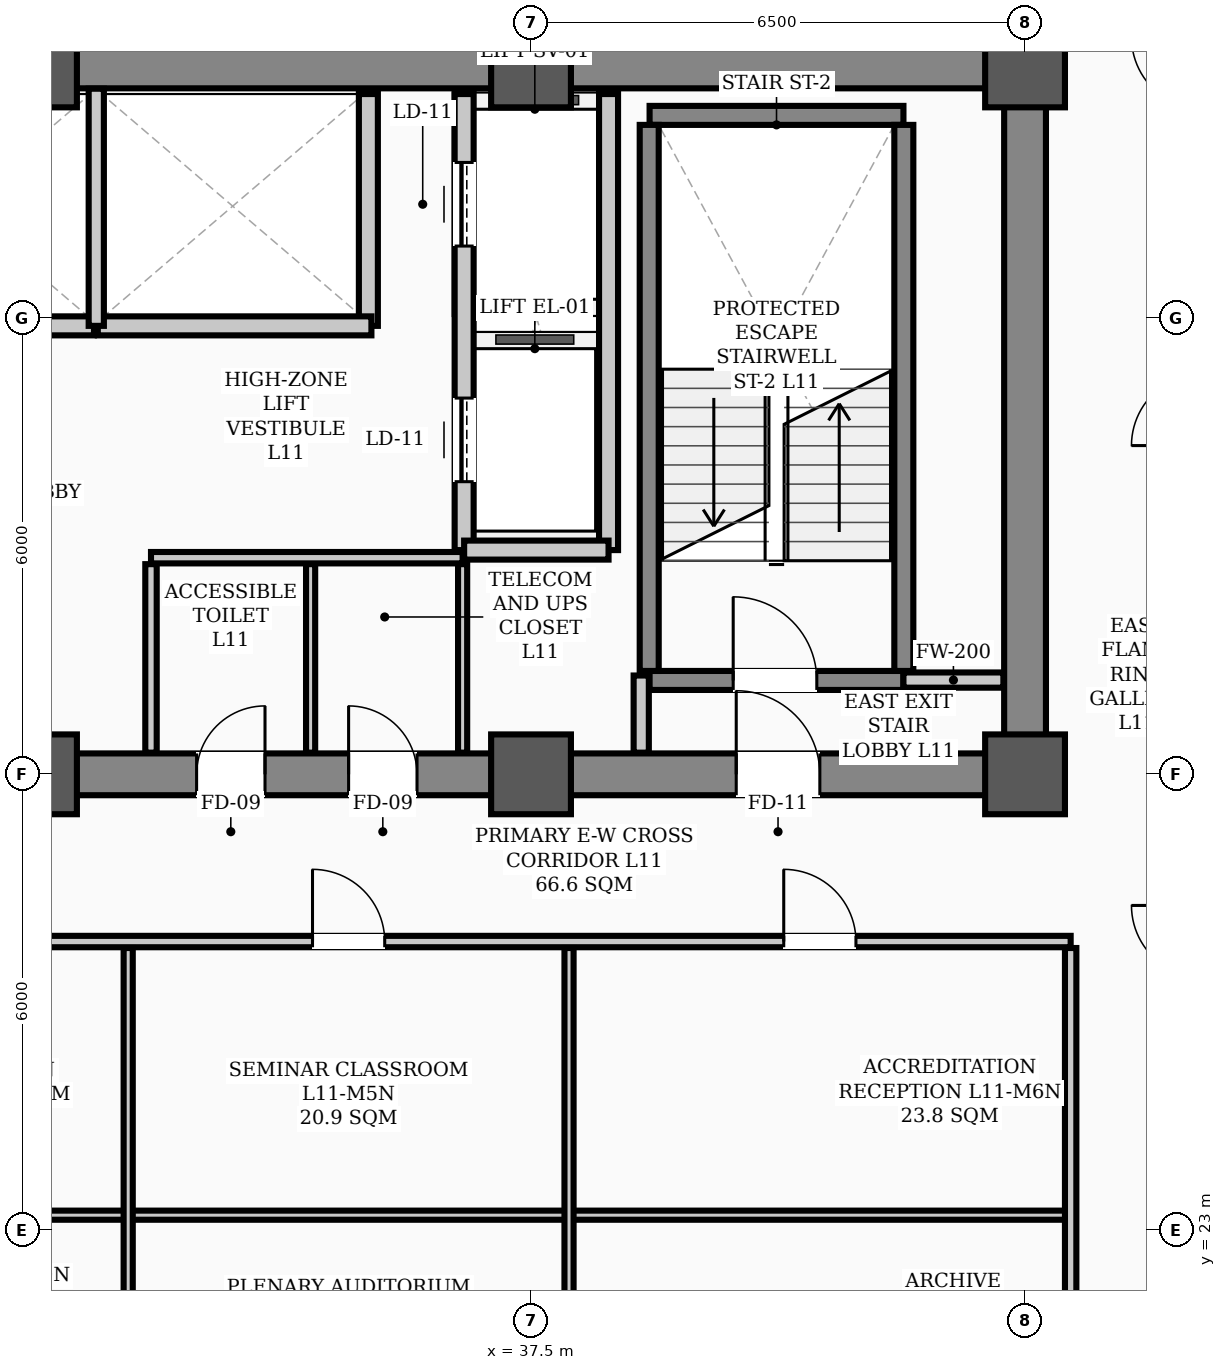
"""IFC4 building model, lengths in metres.
Left out: names, types, materials, properties, quantities, classifications, styles, units other than length and angle.
Written with IfcOpenShell. Run it as: python <this file> out.ifc"""

import sys

from ifc_helpers import new_model, si_unit, direction, frame, frame_2d, origin, origin_2d, place, context, subcontext, project, spatial, rectangle, hollow_rectangle, extrude, element, fill, save


model = new_model("IFC4")
c1 = context("Model", 3, precision=1e-05, world=origin(), true_north=direction((0.0, 1.0)))
c2 = subcontext(c1, "Body", "Model", "MODEL_VIEW")
j1 = project(units=[si_unit("LENGTHUNIT", "METRE"), si_unit("PLANEANGLEUNIT", "RADIAN")], contexts=[c1])
p1 = place(None, origin())
s1 = spatial("IfcSite", under=j1, at=p1, CompositionType="ELEMENT")
p2 = place(p1, origin())
s2 = spatial("IfcBuilding", under=s1, at=p2, CompositionType="ELEMENT")
p3 = place(p2, frame((0.0, 0.0, 46.0)))
s3 = spatial("IfcBuildingStorey", under=s2, at=p3, CompositionType="ELEMENT", Elevation=46.0)
for number, where, z_axis, x_axis in (
    (1, (31.0, 29.0, 0.0), (0.0, 0.0, 1.0), (1.0, 0.0, 0.0)),
    (2, (31.0, 38.3, 0.0), (0.0, 0.0, 1.0), (1.0, 0.0, 0.0)),
    (3, (37.5, 29.0, 0.0), (0.0, 0.0, 1.0), (1.0, 0.0, 0.0)),
    (4, (37.5, 38.3, 0.0), (0.0, 0.0, 1.0), (1.0, 0.0, 0.0)),
    (5, (44.0, 29.0, 0.0), (0.0, 0.0, 1.0), (1.0, 0.0, 0.0)),
    (6, (44.0, 38.3, 0.0), (0.0, 0.0, 1.0), (1.0, 0.0, 0.0)),
):
    element("IfcColumn", number, at=place(p3, frame(where, z_axis=z_axis, x_axis=x_axis)), inside=s3, PredefinedType="COLUMN", context=c2, shape_type="SweptSolid", body=[
        extrude(hollow_rectangle(XDim=1.05, YDim=1.05, WallThickness=0.038, InnerFilletRadius=0.019, OuterFilletRadius=0.057, at=origin_2d()), origin(), (0.0, 0.0, 1.0), 3.9),
    ])
p4 = place(p3, frame((13.5, 29.0, 0.0), z_axis=(0.0, 0.0, 1.0), x_axis=(1.0, 0.0, 0.0)))
e7 = element("IfcWall", 7, at=p4, inside=s3, PredefinedType="SHEAR", context=c2, shape_type="SweptSolid", body=[
    extrude(rectangle(XDim=30.5, YDim=0.55, at=frame_2d((15.25, 0.0))), origin(), (0.0, 0.0, 1.0), 3.72),
])
p5 = place(p4, frame((1.75, 0.0, 0.0)))
e8 = element("IfcOpeningElement", 8, at=p5, cuts=e7, PredefinedType="OPENING", context=c2, shape_type="SweptSolid", body=[
    extrude(rectangle(XDim=1.1, YDim=2.08, at=frame_2d((0.55, 1.04))), frame((0.0, 0.285, 0.0), z_axis=(0.0, -1.0, 0.0), x_axis=(1.0, 0.0, 0.0)), (0.0, 0.0, 1.0), 0.57),
])
p6 = place(p4, frame((26.7, 0.0, 0.0)))
e9 = element("IfcOpeningElement", 9, at=p6, cuts=e7, PredefinedType="OPENING", context=c2, shape_type="SweptSolid", body=[
    extrude(rectangle(XDim=1.1, YDim=2.08, at=frame_2d((0.55, 1.04))), frame((0.0, 0.285, 0.0), z_axis=(0.0, -1.0, 0.0), x_axis=(1.0, 0.0, 0.0)), (0.0, 0.0, 1.0), 0.57),
])
p7 = place(p4, frame((6.8, 0.0, 0.0)))
e10 = element("IfcOpeningElement", 10, at=p7, cuts=e7, PredefinedType="OPENING", context=c2, shape_type="SweptSolid", body=[
    extrude(rectangle(XDim=1.1, YDim=2.08, at=frame_2d((0.55, 1.04))), frame((0.0, 0.285, 0.0), z_axis=(0.0, -1.0, 0.0), x_axis=(1.0, 0.0, 0.0)), (0.0, 0.0, 1.0), 0.57),
])
p8 = place(p4, frame((13.2, 0.0, 0.0)))
e11 = element("IfcOpeningElement", 11, at=p8, cuts=e7, PredefinedType="OPENING", context=c2, shape_type="SweptSolid", body=[
    extrude(rectangle(XDim=1.6, YDim=2.08, at=frame_2d((0.8, 1.04))), frame((0.0, 0.285, 0.0), z_axis=(0.0, -1.0, 0.0), x_axis=(1.0, 0.0, 0.0)), (0.0, 0.0, 1.0), 0.57),
])
p9 = place(p4, frame((19.6, 0.0, 0.0)))
e12 = element("IfcOpeningElement", 12, at=p9, cuts=e7, PredefinedType="OPENING", context=c2, shape_type="SweptSolid", body=[
    extrude(rectangle(XDim=0.9, YDim=2.08, at=frame_2d((0.45, 1.04))), frame((0.0, 0.285, 0.0), z_axis=(0.0, -1.0, 0.0), x_axis=(1.0, 0.0, 0.0)), (0.0, 0.0, 1.0), 0.57),
])
p10 = place(p4, frame((21.6, 0.0, 0.0)))
e13 = element("IfcOpeningElement", 13, at=p10, cuts=e7, PredefinedType="OPENING", context=c2, shape_type="SweptSolid", body=[
    extrude(rectangle(XDim=0.9, YDim=2.08, at=frame_2d((0.45, 1.04))), frame((0.0, 0.285, 0.0), z_axis=(0.0, -1.0, 0.0), x_axis=(1.0, 0.0, 0.0)), (0.0, 0.0, 1.0), 0.57),
])
p11 = place(p3, frame((13.5, 38.3, 0.0), z_axis=(0.0, 0.0, 1.0), x_axis=(1.0, 0.0, 0.0)))
e14 = element("IfcWall", 14, at=p11, inside=s3, PredefinedType="SHEAR", context=c2, shape_type="SweptSolid", body=[
    extrude(rectangle(XDim=30.5, YDim=0.55, at=frame_2d((15.25, 0.0))), origin(), (0.0, 0.0, 1.0), 3.72),
])
p12 = place(p3, frame((44.0, 29.35, 0.0), z_axis=(0.0, 0.0, 1.0), x_axis=(0.0, 1.0, 0.0)))
e15 = element("IfcWall", 15, at=p12, inside=s3, PredefinedType="SHEAR", context=c2, shape_type="SweptSolid", body=[
    extrude(rectangle(XDim=8.6, YDim=0.55, at=frame_2d((4.3, 0.0))), origin(), (0.0, 0.0, 1.0), 3.72),
])
p13 = place(p3, frame((39.06, 30.235, 0.0), z_axis=(0.0, 0.0, 1.0), x_axis=(1.0, 0.0, 0.0)))
e16 = element("IfcWall", 16, at=p13, inside=s3, PredefinedType="STANDARD", context=c2, shape_type="SweptSolid", body=[
    extrude(rectangle(XDim=3.34, YDim=0.25, at=frame_2d((1.67, 0.0))), origin(), (0.0, 0.0, 1.0), 3.72),
])
p14 = place(p13, frame((1.1, 0.0, 0.0)))
e17 = element("IfcOpeningElement", 17, at=p14, cuts=e16, PredefinedType="OPENING", context=c2, shape_type="SweptSolid", body=[
    extrude(rectangle(XDim=1.1, YDim=2.08, at=frame_2d((0.55, 1.04))), frame((0.0, 0.135, 0.0), z_axis=(0.0, -1.0, 0.0), x_axis=(1.0, 0.0, 0.0)), (0.0, 0.0, 1.0), 0.27),
])
p15 = place(p3, frame((39.06, 37.669, 0.0), z_axis=(0.0, 0.0, 1.0), x_axis=(1.0, 0.0, 0.0)))
e18 = element("IfcWall", 18, at=p15, inside=s3, PredefinedType="STANDARD", context=c2, shape_type="SweptSolid", body=[
    extrude(rectangle(XDim=3.34, YDim=0.25, at=frame_2d((1.67, 0.0))), origin(), (0.0, 0.0, 1.0), 3.72),
])
for number, where, z_axis, x_axis in (
    (19, (39.055, 30.36, 0.0), (0.0, 0.0, 1.0), (0.0, 1.0, 0.0)),
    (20, (42.405, 30.36, 0.0), (0.0, 0.0, 1.0), (0.0, 1.0, 0.0)),
):
    element("IfcWall", number, at=place(p3, frame(where, z_axis=z_axis, x_axis=x_axis)), inside=s3, PredefinedType="STANDARD", context=c2, shape_type="SweptSolid", body=[
        extrude(rectangle(XDim=7.184, YDim=0.25, at=frame_2d((3.592, 0.0))), origin(), (0.0, 0.0, 1.0), 3.72),
    ])
p16 = place(p3, frame((36.62, 31.95, 0.0), z_axis=(0.0, 0.0, 1.0), x_axis=(0.0, 1.0, 0.0)))
e21 = element("IfcWall", 21, at=p16, inside=s3, PredefinedType="STANDARD", context=c2, shape_type="SweptSolid", body=[
    extrude(rectangle(XDim=6.0, YDim=0.25, at=frame_2d((3.0, 0.0))), origin(), (0.0, 0.0, 1.0), 3.3),
])
p17 = place(p16, frame((0.9, 0.0, 0.0)))
e22 = element("IfcOpeningElement", 22, at=p17, cuts=e21, PredefinedType="OPENING", context=c2, shape_type="SweptSolid", body=[
    extrude(rectangle(XDim=1.1, YDim=2.08, at=frame_2d((0.55, 1.04))), frame((0.0, 0.135, 0.0), z_axis=(0.0, -1.0, 0.0), x_axis=(1.0, 0.0, 0.0)), (0.0, 0.0, 1.0), 0.27),
])
p18 = place(p16, frame((4.0, 0.0, 0.0)))
e23 = element("IfcOpeningElement", 23, at=p18, cuts=e21, PredefinedType="OPENING", context=c2, shape_type="SweptSolid", body=[
    extrude(rectangle(XDim=1.1, YDim=2.08, at=frame_2d((0.55, 1.04))), frame((0.0, 0.135, 0.0), z_axis=(0.0, -1.0, 0.0), x_axis=(1.0, 0.0, 0.0)), (0.0, 0.0, 1.0), 0.27),
])
p19 = place(p3, frame((38.52, 31.95, 0.0), z_axis=(0.0, 0.0, 1.0), x_axis=(0.0, 1.0, 0.0)))
e24 = element("IfcWall", 24, at=p19, inside=s3, PredefinedType="STANDARD", context=c2, shape_type="SweptSolid", body=[
    extrude(rectangle(XDim=6.0, YDim=0.25, at=frame_2d((3.0, 0.0))), origin(), (0.0, 0.0, 1.0), 3.3),
])
p20 = place(p3, frame((36.62, 31.95, 0.0), z_axis=(0.0, 0.0, 1.0), x_axis=(1.0, 0.0, 0.0)))
e25 = element("IfcWall", 25, at=p20, inside=s3, PredefinedType="STANDARD", context=c2, shape_type="SweptSolid", body=[
    extrude(rectangle(XDim=1.9, YDim=0.25, at=frame_2d((0.95, 0.0))), origin(), (0.0, 0.0, 1.0), 3.48),
])
p21 = place(p3, frame((35.36, 34.9, 0.0), z_axis=(0.0, 0.0, 1.0), x_axis=(0.0, 1.0, 0.0)))
e26 = element("IfcWall", 26, at=p21, inside=s3, PredefinedType="STANDARD", context=c2, shape_type="SweptSolid", body=[
    extrude(rectangle(XDim=3.05, YDim=0.25, at=frame_2d((1.525, 0.0))), origin(), (0.0, 0.0, 1.0), 3.3),
])
p22 = place(p3, frame((28.2, 34.9, 0.0), z_axis=(0.0, 0.0, 1.0), x_axis=(1.0, 0.0, 0.0)))
e27 = element("IfcWall", 27, at=p22, inside=s3, PredefinedType="STANDARD", context=c2, shape_type="SweptSolid", body=[
    extrude(rectangle(XDim=3.55, YDim=0.25, at=frame_2d((1.775, 0.0))), origin(), (0.0, 0.0, 1.0), 3.72),
])
p23 = place(p3, frame((31.8, 34.9, 0.0), z_axis=(0.0, 0.0, 1.0), x_axis=(1.0, 0.0, 0.0)))
e28 = element("IfcWall", 28, at=p23, inside=s3, PredefinedType="STANDARD", context=c2, shape_type="SweptSolid", body=[
    extrude(rectangle(XDim=3.6, YDim=0.25, at=frame_2d((1.8, 0.0))), origin(), (0.0, 0.0, 1.0), 3.72),
])
p24 = place(p3, frame((42.4, 30.24, 0.0), z_axis=(0.0, 0.0, 1.0), x_axis=(1.0, 0.0, 0.0)))
e29 = element("IfcWall", 29, at=p24, inside=s3, PredefinedType="STANDARD", context=c2, shape_type="SweptSolid", body=[
    extrude(rectangle(XDim=1.315, YDim=0.2, at=frame_2d((0.658, 0.0))), origin(), (0.0, 0.0, 1.0), 3.1),
])
p25 = place(p3, frame((32.5, 31.85, 0.0), z_axis=(0.0, 0.0, 1.0), x_axis=(1.0, 0.0, 0.0)))
e30 = element("IfcWall", 30, at=p25, inside=s3, PredefinedType="PARTITIONING", context=c2, shape_type="SweptSolid", body=[
    extrude(rectangle(XDim=4.1, YDim=0.15, at=frame_2d((2.05, 0.0))), origin(), (0.0, 0.0, 1.0), 3.72),
])
p26 = place(p3, frame((12.9, 26.8, 0.0), z_axis=(0.0, 0.0, 1.0), x_axis=(1.0, 0.0, 0.0)))
e31 = element("IfcWall", 31, at=p26, inside=s3, PredefinedType="PARTITIONING", context=c2, shape_type="SweptSolid", body=[
    extrude(rectangle(XDim=31.7, YDim=0.15, at=frame_2d((15.85, 0.0))), origin(), (0.0, 0.0, 1.0), 3.1),
])
p27 = place(p26, frame((13.6, 0.0, 0.0)))
e32 = element("IfcOpeningElement", 32, at=p27, cuts=e31, PredefinedType="OPENING", context=c2, shape_type="SweptSolid", body=[
    extrude(rectangle(XDim=1.6, YDim=2.08, at=frame_2d((0.8, 1.04))), frame((0.0, 0.085, 0.0), z_axis=(0.0, -1.0, 0.0), x_axis=(1.0, 0.0, 0.0)), (0.0, 0.0, 1.0), 0.17),
])
p28 = place(p26, frame((2.175, 0.0, 0.0)))
e33 = element("IfcOpeningElement", 33, at=p28, cuts=e31, PredefinedType="OPENING", context=c2, shape_type="SweptSolid", body=[
    extrude(rectangle(XDim=0.95, YDim=2.08, at=frame_2d((0.475, 1.04))), frame((0.0, 0.085, 0.0), z_axis=(0.0, -1.0, 0.0), x_axis=(1.0, 0.0, 0.0)), (0.0, 0.0, 1.0), 0.17),
])
p29 = place(p26, frame((6.925, 0.0, 0.0)))
e34 = element("IfcOpeningElement", 34, at=p29, cuts=e31, PredefinedType="OPENING", context=c2, shape_type="SweptSolid", body=[
    extrude(rectangle(XDim=0.95, YDim=2.08, at=frame_2d((0.475, 1.04))), frame((0.0, 0.085, 0.0), z_axis=(0.0, -1.0, 0.0), x_axis=(1.0, 0.0, 0.0)), (0.0, 0.0, 1.0), 0.17),
])
p30 = place(p26, frame((10.925, 0.0, 0.0)))
e35 = element("IfcOpeningElement", 35, at=p30, cuts=e31, PredefinedType="OPENING", context=c2, shape_type="SweptSolid", body=[
    extrude(rectangle(XDim=0.95, YDim=2.08, at=frame_2d((0.475, 1.04))), frame((0.0, 0.085, 0.0), z_axis=(0.0, -1.0, 0.0), x_axis=(1.0, 0.0, 0.0)), (0.0, 0.0, 1.0), 0.17),
])
p31 = place(p26, frame((16.025, 0.0, 0.0)))
e36 = element("IfcOpeningElement", 36, at=p31, cuts=e31, PredefinedType="OPENING", context=c2, shape_type="SweptSolid", body=[
    extrude(rectangle(XDim=0.95, YDim=2.08, at=frame_2d((0.475, 1.04))), frame((0.0, 0.085, 0.0), z_axis=(0.0, -1.0, 0.0), x_axis=(1.0, 0.0, 0.0)), (0.0, 0.0, 1.0), 0.17),
])
p32 = place(p26, frame((21.725, 0.0, 0.0)))
e37 = element("IfcOpeningElement", 37, at=p32, cuts=e31, PredefinedType="OPENING", context=c2, shape_type="SweptSolid", body=[
    extrude(rectangle(XDim=0.95, YDim=2.08, at=frame_2d((0.475, 1.04))), frame((0.0, 0.085, 0.0), z_axis=(0.0, -1.0, 0.0), x_axis=(1.0, 0.0, 0.0)), (0.0, 0.0, 1.0), 0.17),
])
p33 = place(p26, frame((27.925, 0.0, 0.0)))
e38 = element("IfcOpeningElement", 38, at=p33, cuts=e31, PredefinedType="OPENING", context=c2, shape_type="SweptSolid", body=[
    extrude(rectangle(XDim=0.95, YDim=2.08, at=frame_2d((0.475, 1.04))), frame((0.0, 0.085, 0.0), z_axis=(0.0, -1.0, 0.0), x_axis=(1.0, 0.0, 0.0)), (0.0, 0.0, 1.0), 0.17),
])
p34 = place(p3, frame((28.4, 23.2, 0.0), z_axis=(0.0, 0.0, 1.0), x_axis=(1.0, 0.0, 0.0)))
e39 = element("IfcWall", 39, at=p34, inside=s3, PredefinedType="PARTITIONING", context=c2, shape_type="SweptSolid", body=[
    extrude(rectangle(XDim=3.8, YDim=0.12, at=frame_2d((1.9, 0.0))), origin(), (0.0, 0.0, 1.0), 3.1),
])
p35 = place(p3, frame((32.2, 23.2, 0.0), z_axis=(0.0, 0.0, 1.0), x_axis=(1.0, 0.0, 0.0)))
e40 = element("IfcWall", 40, at=p35, inside=s3, PredefinedType="PARTITIONING", context=c2, shape_type="SweptSolid", body=[
    extrude(rectangle(XDim=5.8, YDim=0.12, at=frame_2d((2.9, 0.0))), origin(), (0.0, 0.0, 1.0), 3.1),
])
p36 = place(p3, frame((38.0, 23.2, 0.0), z_axis=(0.0, 0.0, 1.0), x_axis=(1.0, 0.0, 0.0)))
e41 = element("IfcWall", 41, at=p36, inside=s3, PredefinedType="PARTITIONING", context=c2, shape_type="SweptSolid", body=[
    extrude(rectangle(XDim=6.6, YDim=0.12, at=frame_2d((3.3, 0.0))), origin(), (0.0, 0.0, 1.0), 3.1),
])
p37 = place(p3, frame((38.95, 29.285, 0.0), z_axis=(0.0, 0.0, 1.0), x_axis=(0.0, 1.0, 0.0)))
e42 = element("IfcWall", 42, at=p37, inside=s3, PredefinedType="STANDARD", context=c2, shape_type="SweptSolid", body=[
    extrude(rectangle(XDim=1.015, YDim=0.2, at=frame_2d((0.508, 0.0))), origin(), (0.0, 0.0, 1.0), 3.3),
])
p38 = place(p3, frame((32.5, 29.285, 0.0), z_axis=(0.0, 0.0, 1.0), x_axis=(0.0, 1.0, 0.0)))
e43 = element("IfcWall", 43, at=p38, inside=s3, PredefinedType="PARTITIONING", context=c2, shape_type="SweptSolid", body=[
    extrude(rectangle(XDim=2.48, YDim=0.15, at=frame_2d((1.24, 0.0))), origin(), (0.0, 0.0, 1.0), 3.3),
])
for number, where, z_axis, x_axis in (
    (44, (36.6, 29.285, 0.0), (0.0, 0.0, 1.0), (0.0, 1.0, 0.0)),
    (45, (34.6, 29.285, 0.0), (0.0, 0.0, 1.0), (0.0, 1.0, 0.0)),
):
    element("IfcWall", number, at=place(p3, frame(where, z_axis=z_axis, x_axis=x_axis)), inside=s3, PredefinedType="PARTITIONING", context=c2, shape_type="SweptSolid", body=[
        extrude(rectangle(XDim=2.48, YDim=0.12, at=frame_2d((1.24, 0.0))), origin(), (0.0, 0.0, 1.0), 3.3),
    ])
p39 = place(p3, frame((44.6, 19.335, 0.0), z_axis=(0.0, 0.0, 1.0), x_axis=(0.0, 1.0, 0.0)))
e46 = element("IfcWall", 46, at=p39, inside=s3, PredefinedType="PARTITIONING", context=c2, shape_type="SweptSolid", body=[
    extrude(rectangle(XDim=7.38, YDim=0.15, at=frame_2d((3.69, 0.0))), origin(), (0.0, 0.0, 1.0), 3.0),
])
for number, where, z_axis, x_axis in (
    (47, (32.2, 19.335, 0.0), (0.0, 0.0, 1.0), (0.0, 1.0, 0.0)),
    (48, (38.0, 19.335, 0.0), (0.0, 0.0, 1.0), (0.0, 1.0, 0.0)),
):
    element("IfcWall", number, at=place(p3, frame(where, z_axis=z_axis, x_axis=x_axis)), inside=s3, PredefinedType="PARTITIONING", context=c2, shape_type="SweptSolid", body=[
        extrude(rectangle(XDim=7.38, YDim=0.12, at=frame_2d((3.69, 0.0))), origin(), (0.0, 0.0, 1.0), 3.0),
    ])
p40 = place(p3, frame((31.78, 34.9, 0.0), z_axis=(0.0, 0.0, 1.0), x_axis=(0.0, 1.0, 0.0)))
e49 = element("IfcWall", 49, at=p40, inside=s3, PredefinedType="STANDARD", context=c2, shape_type="SweptSolid", body=[
    extrude(rectangle(XDim=3.12, YDim=0.2, at=frame_2d((1.56, 0.0))), origin(), (0.0, 0.0, 1.0), 3.3),
])
p41 = place(p14, origin())
e50 = element("IfcDoor", 50, at=p41, inside=s3, OperationType="SINGLE_SWING_LEFT", PredefinedType="DOOR", context=c2, shape_type="SweptSolid", body=[
    extrude(rectangle(XDim=1.1, YDim=2.08, at=frame_2d((0.55, 1.04))), frame((0.0, 0.025, 0.0), z_axis=(0.0, -1.0, 0.0), x_axis=(1.0, 0.0, 0.0)), (0.0, 0.0, 1.0), 0.05),
])
fill(e17, e50)
p42 = place(p6, origin())
e51 = element("IfcDoor", 51, at=p42, inside=s3, OperationType="SINGLE_SWING_LEFT", PredefinedType="DOOR", context=c2, shape_type="SweptSolid", body=[
    extrude(rectangle(XDim=1.1, YDim=2.08, at=frame_2d((0.55, 1.04))), frame((0.0, 0.025, 0.0), z_axis=(0.0, -1.0, 0.0), x_axis=(1.0, 0.0, 0.0)), (0.0, 0.0, 1.0), 0.05),
])
fill(e9, e51)
p43 = place(p9, origin())
e52 = element("IfcDoor", 52, at=p43, inside=s3, OperationType="SINGLE_SWING_RIGHT", PredefinedType="DOOR", context=c2, shape_type="SweptSolid", body=[
    extrude(rectangle(XDim=0.9, YDim=2.08, at=frame_2d((0.45, 1.04))), frame((0.0, 0.025, 0.0), z_axis=(0.0, -1.0, 0.0), x_axis=(1.0, 0.0, 0.0)), (0.0, 0.0, 1.0), 0.05),
])
fill(e12, e52)
p44 = place(p10, origin())
e53 = element("IfcDoor", 53, at=p44, inside=s3, OperationType="SINGLE_SWING_LEFT", PredefinedType="DOOR", context=c2, shape_type="SweptSolid", body=[
    extrude(rectangle(XDim=0.9, YDim=2.08, at=frame_2d((0.45, 1.04))), frame((0.0, 0.025, 0.0), z_axis=(0.0, -1.0, 0.0), x_axis=(1.0, 0.0, 0.0)), (0.0, 0.0, 1.0), 0.05),
])
fill(e13, e53)
p45 = place(p32, origin())
e54 = element("IfcDoor", 54, at=p45, inside=s3, OperationType="SINGLE_SWING_LEFT", PredefinedType="DOOR", context=c2, shape_type="SweptSolid", body=[
    extrude(rectangle(XDim=0.95, YDim=2.08, at=frame_2d((0.475, 1.04))), frame((0.0, 0.025, 0.0), z_axis=(0.0, -1.0, 0.0), x_axis=(1.0, 0.0, 0.0)), (0.0, 0.0, 1.0), 0.05),
])
fill(e37, e54)
p46 = place(p33, origin())
e55 = element("IfcDoor", 55, at=p46, inside=s3, OperationType="SINGLE_SWING_LEFT", PredefinedType="DOOR", context=c2, shape_type="SweptSolid", body=[
    extrude(rectangle(XDim=0.95, YDim=2.08, at=frame_2d((0.475, 1.04))), frame((0.0, 0.025, 0.0), z_axis=(0.0, -1.0, 0.0), x_axis=(1.0, 0.0, 0.0)), (0.0, 0.0, 1.0), 0.05),
])
fill(e38, e55)
p47 = place(p17, origin())
e56 = element("IfcDoor", 56, at=p47, inside=s3, OperationType="SLIDING_TO_LEFT", PredefinedType="DOOR", context=c2, shape_type="SweptSolid", body=[
    extrude(rectangle(XDim=1.1, YDim=2.08, at=frame_2d((0.55, 1.04))), frame((0.0, 0.025, 0.0), z_axis=(0.0, -1.0, 0.0), x_axis=(1.0, 0.0, 0.0)), (0.0, 0.0, 1.0), 0.05),
])
fill(e22, e56)
p48 = place(p18, origin())
e57 = element("IfcDoor", 57, at=p48, inside=s3, OperationType="SLIDING_TO_LEFT", PredefinedType="DOOR", context=c2, shape_type="SweptSolid", body=[
    extrude(rectangle(XDim=1.1, YDim=2.08, at=frame_2d((0.55, 1.04))), frame((0.0, 0.025, 0.0), z_axis=(0.0, -1.0, 0.0), x_axis=(1.0, 0.0, 0.0)), (0.0, 0.0, 1.0), 0.05),
])
fill(e23, e57)
save(model, sys.argv[1])
